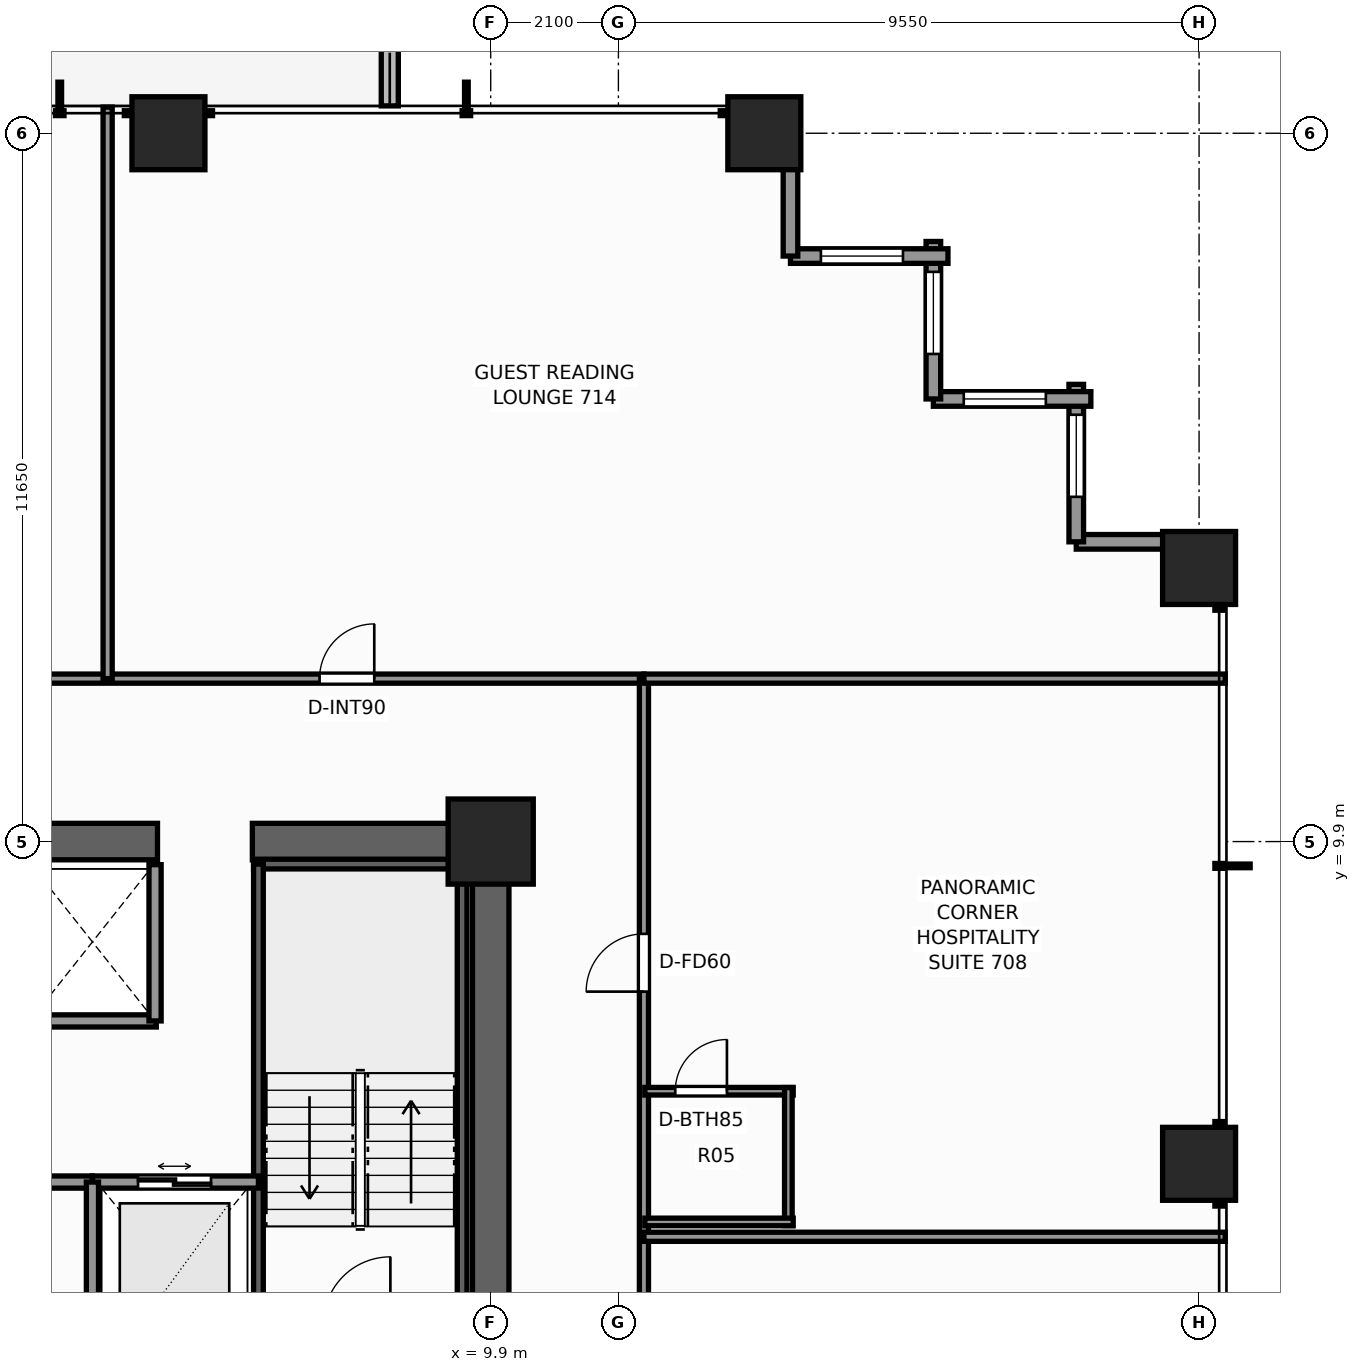
"""IFC4 building model, lengths in metres.
Left out: names, types, materials, properties, quantities, classifications, styles, units other than length and angle.
Written with IfcOpenShell. Run it as: python <this file> out.ifc"""

import sys

from ifc_helpers import new_model, si_unit, direction, frame, frame_2d, origin, origin_2d, place, context, subcontext, project, spatial, rectangle, extrude, element, fill, save


model = new_model("IFC4")
c1 = context("Model", 3, precision=1e-05, world=origin(), true_north=direction((0.0, 1.0)))
c2 = subcontext(c1, "Body", "Model", "MODEL_VIEW")
j1 = project(units=[si_unit("LENGTHUNIT", "METRE"), si_unit("PLANEANGLEUNIT", "RADIAN")], contexts=[c1])
p1 = place(None, origin())
s1 = spatial("IfcSite", under=j1, at=p1, CompositionType="ELEMENT")
p2 = place(p1, origin())
s2 = spatial("IfcBuilding", under=s1, at=p2, CompositionType="ELEMENT")
p3 = place(p2, frame((0.0, 0.0, 27.1)))
s3 = spatial("IfcBuildingStorey", under=s2, at=p3, CompositionType="ELEMENT", Elevation=27.1)
p4 = place(p3, frame((-10.2, 9.9, 0.0), z_axis=(0.0, 0.0, 1.0), x_axis=(1.0, 0.0, 0.0)))
e1 = element("IfcWall", 1, at=p4, inside=s3, PredefinedType="SHEAR", context=c2, shape_type="SweptSolid", body=[
    extrude(rectangle(XDim=14.62, YDim=0.6, at=frame_2d((7.31, 0.0))), origin(), (0.0, 0.0, 1.0), 3.3),
])
p5 = place(p3, frame((5.98, 9.9, 0.0), z_axis=(0.0, 0.0, 1.0), x_axis=(1.0, 0.0, 0.0)))
e2 = element("IfcWall", 2, at=p5, inside=s3, PredefinedType="SHEAR", context=c2, shape_type="SweptSolid", body=[
    extrude(rectangle(XDim=4.22, YDim=0.6, at=frame_2d((2.11, 0.0))), origin(), (0.0, 0.0, 1.0), 3.3),
])
p6 = place(p3, frame((9.9, -3.7, 0.0), z_axis=(0.0, 0.0, 1.0), x_axis=(0.0, 1.0, 0.0)))
e3 = element("IfcWall", 3, at=p6, inside=s3, PredefinedType="SHEAR", context=c2, shape_type="SweptSolid", body=[
    extrude(rectangle(XDim=13.3, YDim=0.6, at=frame_2d((6.65, 0.0))), origin(), (0.0, 0.0, 1.0), 3.3),
])
p7 = place(p6, frame((0.35, 0.0, 0.0)))
e4 = element("IfcOpeningElement", 4, at=p7, cuts=e3, PredefinedType="OPENING", context=c2, shape_type="SweptSolid", body=[
    extrude(rectangle(XDim=1.1, YDim=2.2, at=frame_2d((0.55, 1.1))), frame((0.0, 0.31, 0.0), z_axis=(0.0, -1.0, 0.0), x_axis=(1.0, 0.0, 0.0)), (0.0, 0.0, 1.0), 0.62),
])
p8 = place(p3, frame((9.9, 9.9, 0.0), z_axis=(0.0, 0.0, 1.0), x_axis=(1.0, 0.0, 0.0)))
e5 = element("IfcColumn", 5, at=p8, inside=s3, PredefinedType="COLUMN", context=c2, shape_type="SweptSolid", body=[
    extrude(rectangle(XDim=1.4, YDim=1.4, at=origin_2d()), origin(), (0.0, 0.0, 1.0), 3.3),
])
for number, where, z_axis, x_axis in (
    (6, (4.6, 21.55, 0.0), (0.0, 0.0, 1.0), (1.0, 0.0, 0.0)),
    (7, (14.4, 21.55, 0.0), (0.0, 0.0, 1.0), (1.0, 0.0, 0.0)),
    (8, (21.55, 4.6, 0.0), (0.0, 0.0, 1.0), (1.0, 0.0, 0.0)),
    (9, (21.55, 14.4, 0.0), (0.0, 0.0, 1.0), (1.0, 0.0, 0.0)),
):
    element("IfcColumn", number, at=place(p3, frame(where, z_axis=z_axis, x_axis=x_axis)), inside=s3, PredefinedType="COLUMN", context=c2, shape_type="SweptSolid", body=[
        extrude(rectangle(XDim=1.2, YDim=1.2, at=origin_2d()), origin(), (0.0, 0.0, 1.0), 3.3),
    ])
p9 = place(p3, frame((8.24, 22.0, -0.06), z_axis=(0.0, 0.0, 1.0), x_axis=(0.0, 1.0, 0.0)))
e10 = element("IfcWall", 10, at=p9, inside=s3, PredefinedType="PARAPET", context=c2, shape_type="SweptSolid", body=[
    extrude(rectangle(XDim=2.34, YDim=0.28, at=frame_2d((1.17, 0.0))), origin(), (0.0, 0.0, 1.0), 0.42),
])
p10 = place(p3, frame((19.53, 14.83, 0.0), z_axis=(0.0, 0.0, 1.0), x_axis=(1.0, 0.0, 0.0)))
e11 = element("IfcWall", 11, at=p10, inside=s3, PredefinedType="STANDARD", context=c2, shape_type="SweptSolid", body=[
    extrude(rectangle(XDim=2.59, YDim=0.24, at=frame_2d((1.295, 0.0))), origin(), (0.0, 0.0, 1.0), 2.439),
])
p11 = place(p3, frame((19.53, 17.42, 0.0), z_axis=(0.0, 0.0, 1.0), x_axis=(0.0, -1.0, 0.0)))
e12 = element("IfcWall", 12, at=p11, inside=s3, PredefinedType="STANDARD", context=c2, shape_type="SweptSolid", body=[
    extrude(rectangle(XDim=2.59, YDim=0.24, at=frame_2d((1.295, 0.0))), origin(), (0.0, 0.0, 1.0), 2.439),
])
p12 = place(p11, frame((0.5, 0.0, 0.65)))
e13 = element("IfcOpeningElement", 13, at=p12, cuts=e12, PredefinedType="OPENING", context=c2, shape_type="SweptSolid", body=[
    extrude(rectangle(XDim=1.35, YDim=1.55, at=frame_2d((0.675, 0.775))), frame((0.0, 0.13, 0.0), z_axis=(0.0, -1.0, 0.0), x_axis=(1.0, 0.0, 0.0)), (0.0, 0.0, 1.0), 0.26),
])
p13 = place(p3, frame((17.18, 17.18, 0.0), z_axis=(0.0, 0.0, 1.0), x_axis=(1.0, 0.0, 0.0)))
e14 = element("IfcWall", 14, at=p13, inside=s3, PredefinedType="STANDARD", context=c2, shape_type="SweptSolid", body=[
    extrude(rectangle(XDim=2.59, YDim=0.24, at=frame_2d((1.295, 0.0))), origin(), (0.0, 0.0, 1.0), 2.439),
])
p14 = place(p13, frame((0.5, 0.0, 0.65)))
e15 = element("IfcOpeningElement", 15, at=p14, cuts=e14, PredefinedType="OPENING", context=c2, shape_type="SweptSolid", body=[
    extrude(rectangle(XDim=1.35, YDim=1.55, at=frame_2d((0.675, 0.775))), frame((0.0, 0.13, 0.0), z_axis=(0.0, -1.0, 0.0), x_axis=(1.0, 0.0, 0.0)), (0.0, 0.0, 1.0), 0.26),
])
p15 = place(p3, frame((17.18, 19.77, 0.0), z_axis=(0.0, 0.0, 1.0), x_axis=(0.0, -1.0, 0.0)))
e16 = element("IfcWall", 16, at=p15, inside=s3, PredefinedType="STANDARD", context=c2, shape_type="SweptSolid", body=[
    extrude(rectangle(XDim=2.59, YDim=0.24, at=frame_2d((1.295, 0.0))), origin(), (0.0, 0.0, 1.0), 2.439),
])
p16 = place(p15, frame((0.5, 0.0, 0.65)))
e17 = element("IfcOpeningElement", 17, at=p16, cuts=e16, PredefinedType="OPENING", context=c2, shape_type="SweptSolid", body=[
    extrude(rectangle(XDim=1.35, YDim=1.55, at=frame_2d((0.675, 0.775))), frame((0.0, 0.13, 0.0), z_axis=(0.0, -1.0, 0.0), x_axis=(1.0, 0.0, 0.0)), (0.0, 0.0, 1.0), 0.26),
])
p17 = place(p3, frame((14.83, 19.53, 0.0), z_axis=(0.0, 0.0, 1.0), x_axis=(1.0, 0.0, 0.0)))
e18 = element("IfcWall", 18, at=p17, inside=s3, PredefinedType="STANDARD", context=c2, shape_type="SweptSolid", body=[
    extrude(rectangle(XDim=2.59, YDim=0.24, at=frame_2d((1.295, 0.0))), origin(), (0.0, 0.0, 1.0), 2.439),
])
p18 = place(p17, frame((0.5, 0.0, 0.65)))
e19 = element("IfcOpeningElement", 19, at=p18, cuts=e18, PredefinedType="OPENING", context=c2, shape_type="SweptSolid", body=[
    extrude(rectangle(XDim=1.35, YDim=1.55, at=frame_2d((0.675, 0.775))), frame((0.0, 0.13, 0.0), z_axis=(0.0, -1.0, 0.0), x_axis=(1.0, 0.0, 0.0)), (0.0, 0.0, 1.0), 0.26),
])
p19 = place(p3, frame((14.83, 22.12, 0.0), z_axis=(0.0, 0.0, 1.0), x_axis=(0.0, -1.0, 0.0)))
e20 = element("IfcWall", 20, at=p19, inside=s3, PredefinedType="STANDARD", context=c2, shape_type="SweptSolid", body=[
    extrude(rectangle(XDim=2.59, YDim=0.24, at=frame_2d((1.295, 0.0))), origin(), (0.0, 0.0, 1.0), 2.439),
])
p20 = place(p3, frame((6.0, 9.53, 0.0), z_axis=(0.0, 0.0, 1.0), x_axis=(1.0, 0.0, 0.0)))
e21 = element("IfcWall", 21, at=p20, inside=s3, PredefinedType="SHEAR", context=c2, shape_type="SweptSolid", body=[
    extrude(rectangle(XDim=3.52, YDim=0.16, at=frame_2d((1.76, 0.0))), origin(), (0.0, 0.0, 1.0), 3.3),
])
for number, where, z_axis, x_axis in (
    (22, (6.08, 1.97, 0.0), (0.0, 0.0, 1.0), (0.0, 1.0, 0.0)),
    (23, (9.43, 1.97, 0.0), (0.0, 0.0, 1.0), (0.0, 1.0, 0.0)),
):
    element("IfcWall", number, at=place(p3, frame(where, z_axis=z_axis, x_axis=x_axis)), inside=s3, PredefinedType="SHEAR", context=c2, shape_type="SweptSolid", body=[
        extrude(rectangle(XDim=7.56, YDim=0.16, at=frame_2d((3.78, 0.0))), origin(), (0.0, 0.0, 1.0), 3.3),
    ])
p21 = place(p3, frame((3.35, 4.3, 0.0), z_axis=(0.0, 0.0, 1.0), x_axis=(1.0, 0.0, 0.0)))
e24 = element("IfcWall", 24, at=p21, inside=s3, PredefinedType="SOLIDWALL", context=c2, shape_type="SweptSolid", body=[
    extrude(rectangle(XDim=2.73, YDim=0.2, at=frame_2d((1.365, 0.0))), origin(), (0.0, 0.0, 1.0), 3.06),
])
p22 = place(p21, frame((0.75, 0.0, 0.0)))
e25 = element("IfcOpeningElement", 25, at=p22, cuts=e24, PredefinedType="OPENING", context=c2, shape_type="SweptSolid", body=[
    extrude(rectangle(XDim=1.2, YDim=2.25, at=frame_2d((0.6, 1.125))), frame((0.0, 0.11, 0.0), z_axis=(0.0, -1.0, 0.0), x_axis=(1.0, 0.0, 0.0)), (0.0, 0.0, 1.0), 0.22),
])
p23 = place(p3, frame((0.22, 6.95, 0.0), z_axis=(0.0, 0.0, 1.0), x_axis=(1.0, 0.0, 0.0)))
e26 = element("IfcWall", 26, at=p23, inside=s3, PredefinedType="SOLIDWALL", context=c2, shape_type="SweptSolid", body=[
    extrude(rectangle(XDim=4.18, YDim=0.2, at=frame_2d((2.09, 0.0))), origin(), (0.0, 0.0, 1.0), 3.06),
])
p24 = place(p3, frame((4.38, 6.95, 0.0), z_axis=(0.0, 0.0, 1.0), x_axis=(0.0, 1.0, 0.0)))
e27 = element("IfcWall", 27, at=p24, inside=s3, PredefinedType="SOLIDWALL", context=c2, shape_type="SweptSolid", body=[
    extrude(rectangle(XDim=2.57, YDim=0.2, at=frame_2d((1.285, 0.0))), origin(), (0.0, 0.0, 1.0), 3.06),
])
p25 = place(p3, frame((-3.35, 4.3, 0.0), z_axis=(0.0, 0.0, 1.0), x_axis=(1.0, 0.0, 0.0)))
e28 = element("IfcWall", 28, at=p25, inside=s3, PredefinedType="SOLIDWALL", context=c2, shape_type="SweptSolid", body=[
    extrude(rectangle(XDim=6.7, YDim=0.2, at=frame_2d((3.35, 0.0))), origin(), (0.0, 0.0, 1.0), 3.06),
])
p26 = place(p25, frame((4.35, 0.0, 0.0)))
e29 = element("IfcOpeningElement", 29, at=p26, cuts=e28, PredefinedType="OPENING", context=c2, shape_type="SweptSolid", body=[
    extrude(rectangle(XDim=0.95, YDim=2.06, at=frame_2d((0.475, 1.03))), frame((0.0, 0.11, 0.0), z_axis=(0.0, -1.0, 0.0), x_axis=(1.0, 0.0, 0.0)), (0.0, 0.0, 1.0), 0.22),
])
p27 = place(p3, frame((3.35, 1.1, 0.0), z_axis=(0.0, 0.0, 1.0), x_axis=(0.0, 1.0, 0.0)))
e30 = element("IfcWall", 30, at=p27, inside=s3, PredefinedType="SOLIDWALL", context=c2, shape_type="SweptSolid", body=[
    extrude(rectangle(XDim=3.2, YDim=0.2, at=frame_2d((1.6, 0.0))), origin(), (0.0, 0.0, 1.0), 3.06),
])
p28 = place(p3, frame((-12.26, 12.58, 0.0), z_axis=(0.0, 0.0, 1.0), x_axis=(1.0, 0.0, 0.0)))
e31 = element("IfcWall", 31, at=p28, inside=s3, PredefinedType="PARTITIONING", context=c2, shape_type="SweptSolid", body=[
    extrude(rectangle(XDim=24.68, YDim=0.15, at=frame_2d((12.34, 0.0))), origin(), (0.0, 0.0, 1.0), 2.272),
])
p29 = place(p28, frame((3.444, 0.0, 0.0)))
e32 = element("IfcOpeningElement", 32, at=p29, cuts=e31, PredefinedType="OPENING", context=c2, shape_type="SweptSolid", body=[
    extrude(rectangle(XDim=0.9, YDim=2.06, at=frame_2d((0.45, 1.03))), frame((0.0, 0.085, 0.0), z_axis=(0.0, -1.0, 0.0), x_axis=(1.0, 0.0, 0.0)), (0.0, 0.0, 1.0), 0.17),
])
p30 = place(p28, frame((9.78, 0.0, 0.0)))
e33 = element("IfcOpeningElement", 33, at=p30, cuts=e31, PredefinedType="OPENING", context=c2, shape_type="SweptSolid", body=[
    extrude(rectangle(XDim=0.9, YDim=2.06, at=frame_2d((0.45, 1.03))), frame((0.0, 0.085, 0.0), z_axis=(0.0, -1.0, 0.0), x_axis=(1.0, 0.0, 0.0)), (0.0, 0.0, 1.0), 0.17),
])
p31 = place(p28, frame((19.345, 0.0, 0.0)))
e34 = element("IfcOpeningElement", 34, at=p31, cuts=e31, PredefinedType="OPENING", context=c2, shape_type="SweptSolid", body=[
    extrude(rectangle(XDim=0.9, YDim=2.06, at=frame_2d((0.45, 1.03))), frame((0.0, 0.085, 0.0), z_axis=(0.0, -1.0, 0.0), x_axis=(1.0, 0.0, 0.0)), (0.0, 0.0, 1.0), 0.17),
])
p32 = place(p3, frame((12.42, -12.26, 0.0), z_axis=(0.0, 0.0, 1.0), x_axis=(0.0, 1.0, 0.0)))
e35 = element("IfcWall", 35, at=p32, inside=s3, PredefinedType="PARTITIONING", context=c2, shape_type="SweptSolid", body=[
    extrude(rectangle(XDim=24.84, YDim=0.15, at=frame_2d((12.42, 0.0))), origin(), (0.0, 0.0, 1.0), 2.272),
])
p33 = place(p32, frame((4.099, 0.0, 0.0)))
e36 = element("IfcOpeningElement", 36, at=p33, cuts=e35, PredefinedType="OPENING", context=c2, shape_type="SweptSolid", body=[
    extrude(rectangle(XDim=0.95, YDim=2.06, at=frame_2d((0.475, 1.03))), frame((0.0, 0.085, 0.0), z_axis=(0.0, -1.0, 0.0), x_axis=(1.0, 0.0, 0.0)), (0.0, 0.0, 1.0), 0.17),
])
p34 = place(p32, frame((13.577, 0.0, 0.0)))
e37 = element("IfcOpeningElement", 37, at=p34, cuts=e35, PredefinedType="OPENING", context=c2, shape_type="SweptSolid", body=[
    extrude(rectangle(XDim=0.95, YDim=2.06, at=frame_2d((0.475, 1.03))), frame((0.0, 0.085, 0.0), z_axis=(0.0, -1.0, 0.0), x_axis=(1.0, 0.0, 0.0)), (0.0, 0.0, 1.0), 0.17),
])
p35 = place(p32, frame((19.692, 0.0, 0.0)))
e38 = element("IfcOpeningElement", 38, at=p35, cuts=e35, PredefinedType="OPENING", context=c2, shape_type="SweptSolid", body=[
    extrude(rectangle(XDim=0.95, YDim=2.06, at=frame_2d((0.475, 1.03))), frame((0.0, 0.085, 0.0), z_axis=(0.0, -1.0, 0.0), x_axis=(1.0, 0.0, 0.0)), (0.0, 0.0, 1.0), 0.17),
])
p36 = place(p3, frame((12.42, 12.58, 0.0), z_axis=(0.0, 0.0, 1.0), x_axis=(1.0, 0.0, 0.0)))
e39 = element("IfcWall", 39, at=p36, inside=s3, PredefinedType="PARTITIONING", context=c2, shape_type="SweptSolid", body=[
    extrude(rectangle(XDim=9.56, YDim=0.15, at=frame_2d((4.78, 0.0))), origin(), (0.0, 0.0, 1.0), 2.272),
])
p37 = place(p3, frame((12.42, 3.4, 0.0), z_axis=(0.0, 0.0, 1.0), x_axis=(1.0, 0.0, 0.0)))
e40 = element("IfcWall", 40, at=p37, inside=s3, PredefinedType="PARTITIONING", context=c2, shape_type="SweptSolid", body=[
    extrude(rectangle(XDim=9.56, YDim=0.15, at=frame_2d((4.78, 0.0))), origin(), (0.0, 0.0, 1.0), 2.429),
])
p38 = place(p3, frame((12.435, 5.794, 0.0), z_axis=(0.0, 0.0, 1.0), x_axis=(1.0, 0.0, 0.0)))
e41 = element("IfcWall", 41, at=p38, inside=s3, PredefinedType="PARTITIONING", context=c2, shape_type="SweptSolid", body=[
    extrude(rectangle(XDim=2.44, YDim=0.125, at=frame_2d((1.22, 0.0))), origin(), (0.0, 0.0, 1.0), 3.06),
])
p39 = place(p38, frame((0.5, 0.0, 0.0)))
e42 = element("IfcOpeningElement", 42, at=p39, cuts=e41, PredefinedType="OPENING", context=c2, shape_type="SweptSolid", body=[
    extrude(rectangle(XDim=0.85, YDim=2.03, at=frame_2d((0.425, 1.015))), frame((0.0, 0.073, 0.0), z_axis=(0.0, -1.0, 0.0), x_axis=(1.0, 0.0, 0.0)), (0.0, 0.0, 1.0), 0.145),
])
p40 = place(p3, frame((14.795, 3.584, 0.0), z_axis=(0.0, 0.0, 1.0), x_axis=(0.0, 1.0, 0.0)))
e43 = element("IfcWall", 43, at=p40, inside=s3, PredefinedType="PARTITIONING", context=c2, shape_type="SweptSolid", body=[
    extrude(rectangle(XDim=2.27, YDim=0.125, at=frame_2d((1.135, 0.0))), origin(), (0.0, 0.0, 1.0), 2.272),
])
p41 = place(p3, frame((12.435, 3.644, 0.0), z_axis=(0.0, 0.0, 1.0), x_axis=(1.0, 0.0, 0.0)))
e44 = element("IfcWall", 44, at=p41, inside=s3, PredefinedType="PARTITIONING", context=c2, shape_type="SweptSolid", body=[
    extrude(rectangle(XDim=2.44, YDim=0.125, at=frame_2d((1.22, 0.0))), origin(), (0.0, 0.0, 1.0), 3.06),
])
p42 = place(p3, frame((3.6, 12.58, 0.0), z_axis=(0.0, 0.0, 1.0), x_axis=(0.0, 1.0, 0.0)))
e45 = element("IfcWall", 45, at=p42, inside=s3, PredefinedType="PARTITIONING", context=c2, shape_type="SweptSolid", body=[
    extrude(rectangle(XDim=9.4, YDim=0.15, at=frame_2d((4.7, 0.0))), origin(), (0.0, 0.0, 1.0), 2.429),
])
p43 = place(p12, origin())
e46 = element("IfcWindow", 46, at=p43, inside=s3, PartitioningType="SINGLE_PANEL", PredefinedType="WINDOW", context=c2, shape_type="SweptSolid", body=[
    extrude(rectangle(XDim=1.35, YDim=1.55, at=frame_2d((0.675, 0.775))), frame((0.0, 0.03, 0.0), z_axis=(0.0, -1.0, 0.0), x_axis=(1.0, 0.0, 0.0)), (0.0, 0.0, 1.0), 0.06),
])
fill(e13, e46)
p44 = place(p14, origin())
e47 = element("IfcWindow", 47, at=p44, inside=s3, PartitioningType="SINGLE_PANEL", PredefinedType="WINDOW", context=c2, shape_type="SweptSolid", body=[
    extrude(rectangle(XDim=1.35, YDim=1.55, at=frame_2d((0.675, 0.775))), frame((0.0, 0.03, 0.0), z_axis=(0.0, -1.0, 0.0), x_axis=(1.0, 0.0, 0.0)), (0.0, 0.0, 1.0), 0.06),
])
fill(e15, e47)
p45 = place(p16, origin())
e48 = element("IfcWindow", 48, at=p45, inside=s3, PartitioningType="SINGLE_PANEL", PredefinedType="WINDOW", context=c2, shape_type="SweptSolid", body=[
    extrude(rectangle(XDim=1.35, YDim=1.55, at=frame_2d((0.675, 0.775))), frame((0.0, 0.03, 0.0), z_axis=(0.0, -1.0, 0.0), x_axis=(1.0, 0.0, 0.0)), (0.0, 0.0, 1.0), 0.06),
])
fill(e17, e48)
p46 = place(p18, origin())
e49 = element("IfcWindow", 49, at=p46, inside=s3, PartitioningType="SINGLE_PANEL", PredefinedType="WINDOW", context=c2, shape_type="SweptSolid", body=[
    extrude(rectangle(XDim=1.35, YDim=1.55, at=frame_2d((0.675, 0.775))), frame((0.0, 0.03, 0.0), z_axis=(0.0, -1.0, 0.0), x_axis=(1.0, 0.0, 0.0)), (0.0, 0.0, 1.0), 0.06),
])
fill(e19, e49)
p47 = place(p22, origin())
e50 = element("IfcDoor", 50, at=p47, inside=s3, OperationType="DOUBLE_DOOR_SLIDING", PredefinedType="DOOR", context=c2, shape_type="SweptSolid", body=[
    extrude(rectangle(XDim=1.2, YDim=2.25, at=frame_2d((0.6, 1.125))), frame((0.0, 0.025, 0.0), z_axis=(0.0, -1.0, 0.0), x_axis=(1.0, 0.0, 0.0)), (0.0, 0.0, 1.0), 0.05),
])
fill(e25, e50)
p48 = place(p39, origin())
e51 = element("IfcDoor", 51, at=p48, inside=s3, OperationType="SINGLE_SWING_RIGHT", PredefinedType="DOOR", context=c2, shape_type="SweptSolid", body=[
    extrude(rectangle(XDim=0.85, YDim=2.03, at=frame_2d((0.425, 1.015))), frame((0.0, 0.025, 0.0), z_axis=(0.0, -1.0, 0.0), x_axis=(1.0, 0.0, 0.0)), (0.0, 0.0, 1.0), 0.05),
])
fill(e42, e51)
p49 = place(p35, origin())
e52 = element("IfcDoor", 52, at=p49, inside=s3, OperationType="SINGLE_SWING_LEFT", PredefinedType="DOOR", context=c2, shape_type="SweptSolid", body=[
    extrude(rectangle(XDim=0.95, YDim=2.06, at=frame_2d((0.475, 1.03))), frame((0.0, 0.025, 0.0), z_axis=(0.0, -1.0, 0.0), x_axis=(1.0, 0.0, 0.0)), (0.0, 0.0, 1.0), 0.05),
])
fill(e38, e52)
p50 = place(p31, origin())
e53 = element("IfcDoor", 53, at=p50, inside=s3, OperationType="SINGLE_SWING_RIGHT", PredefinedType="DOOR", context=c2, shape_type="SweptSolid", body=[
    extrude(rectangle(XDim=0.9, YDim=2.06, at=frame_2d((0.45, 1.03))), frame((0.0, 0.025, 0.0), z_axis=(0.0, -1.0, 0.0), x_axis=(1.0, 0.0, 0.0)), (0.0, 0.0, 1.0), 0.05),
])
fill(e34, e53)
save(model, sys.argv[1])
